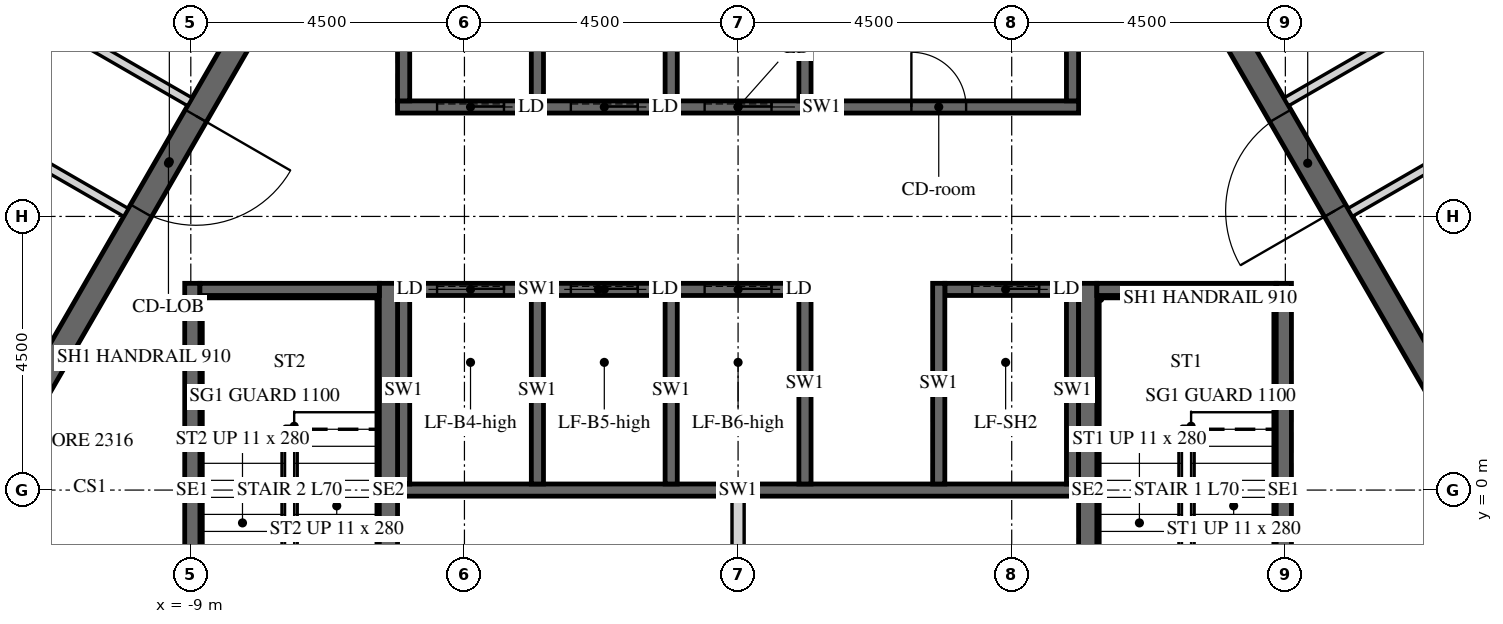
"""IFC4 building model, lengths in metres.
Left out: names, types, materials, properties, quantities, classifications, styles, units other than length and angle.
Written with IfcOpenShell. Run it as: python <this file> out.ifc"""

import sys

from ifc_helpers import new_model, si_unit, direction, frame, frame_2d, origin, place, context, subcontext, project, spatial, polyline, rectangle, outline, extrude, element, fill, save


model = new_model("IFC4")
c1 = context("Model", 3, precision=1e-05, world=origin(), true_north=direction((0.0, 1.0)))
c2 = subcontext(c1, "Body", "Model", "MODEL_VIEW")
j1 = project(units=[si_unit("LENGTHUNIT", "METRE"), si_unit("PLANEANGLEUNIT", "RADIAN")], contexts=[c1])
p1 = place(None, origin())
s1 = spatial("IfcSite", under=j1, at=p1, CompositionType="ELEMENT")
p2 = place(p1, origin())
s2 = spatial("IfcBuilding", under=s1, at=p2, CompositionType="ELEMENT")
p3 = place(p2, frame((0.0, 0.0, 291.3)))
s3 = spatial("IfcBuildingStorey", under=s2, at=p3, CompositionType="ELEMENT", Elevation=291.3)
p4 = place(p3, frame((-6.235, 10.8, -0.15), z_axis=(0.0, 0.0, 1.0), x_axis=(-0.499996419489, -0.866027470984, 0.0)))
e1 = element("IfcWall", 1, at=p4, inside=s3, PredefinedType="SHEAR", context=c2, shape_type="SweptSolid", body=[
    extrude(outline(polyline([(-0.115, -0.2), (12.586, -0.2), (12.355, 0.2), (0.115, 0.2), (-0.115, -0.2)])), origin(), (0.0, 0.0, 1.0), 3.9),
])
p5 = place(p4, frame((5.364, 0.0, 0.15)))
e2 = element("IfcOpeningElement", 2, at=p5, cuts=e1, PredefinedType="OPENING", context=c2, shape_type="SweptSolid", body=[
    extrude(rectangle(XDim=1.8, YDim=2.4, at=frame_2d((0.9, 1.2))), frame((0.0, 0.21, 0.0), z_axis=(0.0, -1.0, 0.0), x_axis=(1.0, 0.0, 0.0)), (0.0, 0.0, 1.0), 0.42),
])
p6 = place(p3, frame((-12.471, 0.0, -0.15), z_axis=(0.0, 0.0, 1.0), x_axis=(0.499996419489, -0.866027470984, 0.0)))
e3 = element("IfcWall", 3, at=p6, inside=s3, PredefinedType="SHEAR", context=c2, shape_type="SweptSolid", body=[
    extrude(outline(polyline([(-0.115, -0.2), (12.586, -0.2), (12.355, 0.2), (0.115, 0.2), (-0.115, -0.2)])), origin(), (0.0, 0.0, 1.0), 3.9),
])
p7 = place(p6, frame((5.306, 0.0, 0.15)))
e4 = element("IfcOpeningElement", 4, at=p7, cuts=e3, PredefinedType="OPENING", context=c2, shape_type="SweptSolid", body=[
    extrude(rectangle(XDim=1.8, YDim=2.4, at=frame_2d((0.9, 1.2))), frame((0.0, 0.21, 0.0), z_axis=(0.0, -1.0, 0.0), x_axis=(1.0, 0.0, 0.0)), (0.0, 0.0, 1.0), 0.42),
])
p8 = place(p3, frame((6.235, -10.8, -0.15), z_axis=(0.0, 0.0, 1.0), x_axis=(0.499996419489, 0.866027470984, 0.0)))
e5 = element("IfcWall", 5, at=p8, inside=s3, PredefinedType="SHEAR", context=c2, shape_type="SweptSolid", body=[
    extrude(outline(polyline([(-0.115, -0.2), (12.586, -0.2), (12.355, 0.2), (0.115, 0.2), (-0.115, -0.2)])), origin(), (0.0, 0.0, 1.0), 3.9),
])
p9 = place(p8, frame((5.364, 0.0, 0.15)))
e6 = element("IfcOpeningElement", 6, at=p9, cuts=e5, PredefinedType="OPENING", context=c2, shape_type="SweptSolid", body=[
    extrude(rectangle(XDim=1.8, YDim=2.4, at=frame_2d((0.9, 1.2))), frame((0.0, 0.21, 0.0), z_axis=(0.0, -1.0, 0.0), x_axis=(1.0, 0.0, 0.0)), (0.0, 0.0, 1.0), 0.42),
])
p10 = place(p3, frame((12.471, 0.0, -0.15), z_axis=(0.0, 0.0, 1.0), x_axis=(-0.499996419489, 0.866027470984, 0.0)))
e7 = element("IfcWall", 7, at=p10, inside=s3, PredefinedType="SHEAR", context=c2, shape_type="SweptSolid", body=[
    extrude(outline(polyline([(-0.115, -0.2), (12.586, -0.2), (12.355, 0.2), (0.115, 0.2), (-0.115, -0.2)])), origin(), (0.0, 0.0, 1.0), 3.9),
])
p11 = place(p10, frame((5.306, 0.0, 0.15)))
e8 = element("IfcOpeningElement", 8, at=p11, cuts=e7, PredefinedType="OPENING", context=c2, shape_type="SweptSolid", body=[
    extrude(rectangle(XDim=1.8, YDim=2.4, at=frame_2d((0.9, 1.2))), frame((0.0, 0.21, 0.0), z_axis=(0.0, -1.0, 0.0), x_axis=(1.0, 0.0, 0.0)), (0.0, 0.0, 1.0), 0.42),
])
p12 = place(p3, frame((-5.6, 6.3, -0.25), z_axis=(0.0, 0.0, 1.0), x_axis=(1.0, 0.0, 0.0)))
e9 = element("IfcWall", 9, at=p12, inside=s3, PredefinedType="SHEAR", context=c2, shape_type="SweptSolid", body=[
    extrude(rectangle(XDim=11.2, YDim=0.2, at=frame_2d((5.6, 0.0))), origin(), (0.0, 0.0, 1.0), 3.9),
])
p13 = place(p12, frame((8.45, 0.0, 0.25)))
e10 = element("IfcOpeningElement", 10, at=p13, cuts=e9, PredefinedType="OPENING", context=c2, shape_type="SweptSolid", body=[
    extrude(rectangle(XDim=0.9, YDim=2.1, at=frame_2d((0.45, 1.05))), frame((0.0, 0.11, 0.0), z_axis=(0.0, -1.0, 0.0), x_axis=(1.0, 0.0, 0.0)), (0.0, 0.0, 1.0), 0.22),
])
p14 = place(p12, frame((0.65, 0.0, 0.25)))
e11 = element("IfcOpeningElement", 11, at=p14, cuts=e9, PredefinedType="OPENING", context=c2, shape_type="SweptSolid", body=[
    extrude(rectangle(XDim=1.1, YDim=2.1, at=frame_2d((0.55, 1.05))), frame((0.0, 0.11, 0.0), z_axis=(0.0, -1.0, 0.0), x_axis=(1.0, 0.0, 0.0)), (0.0, 0.0, 1.0), 0.22),
])
p15 = place(p12, frame((2.85, 0.0, 0.25)))
e12 = element("IfcOpeningElement", 12, at=p15, cuts=e9, PredefinedType="OPENING", context=c2, shape_type="SweptSolid", body=[
    extrude(rectangle(XDim=1.1, YDim=2.1, at=frame_2d((0.55, 1.05))), frame((0.0, 0.11, 0.0), z_axis=(0.0, -1.0, 0.0), x_axis=(1.0, 0.0, 0.0)), (0.0, 0.0, 1.0), 0.22),
])
p16 = place(p12, frame((5.05, 0.0, 0.25)))
e13 = element("IfcOpeningElement", 13, at=p16, cuts=e9, PredefinedType="OPENING", context=c2, shape_type="SweptSolid", body=[
    extrude(rectangle(XDim=1.1, YDim=2.1, at=frame_2d((0.55, 1.05))), frame((0.0, 0.11, 0.0), z_axis=(0.0, -1.0, 0.0), x_axis=(1.0, 0.0, 0.0)), (0.0, 0.0, 1.0), 0.22),
])
for number, where, z_axis, x_axis in (
    (14, (-5.5, 6.4, -0.25), (0.0, 0.0, 1.0), (0.0, 1.0, 0.0)),
    (15, (-3.3, 6.4, -0.25), (0.0, 0.0, 1.0), (0.0, 1.0, 0.0)),
    (16, (-1.1, 6.4, -0.25), (0.0, 0.0, 1.0), (0.0, 1.0, 0.0)),
    (17, (1.1, 6.4, -0.25), (0.0, 0.0, 1.0), (0.0, 1.0, 0.0)),
    (18, (5.5, 6.4, -0.25), (0.0, 0.0, 1.0), (0.0, 1.0, 0.0)),
):
    element("IfcWall", number, at=place(p3, frame(where, z_axis=z_axis, x_axis=x_axis)), inside=s3, PredefinedType="SHEAR", context=c2, shape_type="SweptSolid", body=[
        extrude(rectangle(XDim=2.9, YDim=0.2, at=frame_2d((1.45, 0.0))), origin(), (0.0, 0.0, 1.0), 3.9),
    ])
p17 = place(p3, frame((-5.6, 3.3, -0.25), z_axis=(0.0, 0.0, 1.0), x_axis=(1.0, 0.0, 0.0)))
e19 = element("IfcWall", 19, at=p17, inside=s3, PredefinedType="SHEAR", context=c2, shape_type="SweptSolid", body=[
    extrude(rectangle(XDim=6.6, YDim=0.2, at=frame_2d((3.3, 0.0))), origin(), (0.0, 0.0, 1.0), 3.9),
])
p18 = place(p17, frame((0.65, 0.0, 0.25)))
e20 = element("IfcOpeningElement", 20, at=p18, cuts=e19, PredefinedType="OPENING", context=c2, shape_type="SweptSolid", body=[
    extrude(rectangle(XDim=1.1, YDim=2.1, at=frame_2d((0.55, 1.05))), frame((0.0, 0.11, 0.0), z_axis=(0.0, -1.0, 0.0), x_axis=(1.0, 0.0, 0.0)), (0.0, 0.0, 1.0), 0.22),
])
p19 = place(p17, frame((2.85, 0.0, 0.25)))
e21 = element("IfcOpeningElement", 21, at=p19, cuts=e19, PredefinedType="OPENING", context=c2, shape_type="SweptSolid", body=[
    extrude(rectangle(XDim=1.1, YDim=2.1, at=frame_2d((0.55, 1.05))), frame((0.0, 0.11, 0.0), z_axis=(0.0, -1.0, 0.0), x_axis=(1.0, 0.0, 0.0)), (0.0, 0.0, 1.0), 0.22),
])
p20 = place(p17, frame((5.05, 0.0, 0.25)))
e22 = element("IfcOpeningElement", 22, at=p20, cuts=e19, PredefinedType="OPENING", context=c2, shape_type="SweptSolid", body=[
    extrude(rectangle(XDim=1.1, YDim=2.1, at=frame_2d((0.55, 1.05))), frame((0.0, 0.11, 0.0), z_axis=(0.0, -1.0, 0.0), x_axis=(1.0, 0.0, 0.0)), (0.0, 0.0, 1.0), 0.22),
])
p21 = place(p3, frame((3.4, 3.3, -0.25), z_axis=(0.0, 0.0, 1.0), x_axis=(1.0, 0.0, 0.0)))
e23 = element("IfcWall", 23, at=p21, inside=s3, PredefinedType="SHEAR", context=c2, shape_type="SweptSolid", body=[
    extrude(rectangle(XDim=2.2, YDim=0.2, at=frame_2d((1.1, 0.0))), origin(), (0.0, 0.0, 1.0), 3.9),
])
p22 = place(p21, frame((0.45, 0.0, 0.25)))
e24 = element("IfcOpeningElement", 24, at=p22, cuts=e23, PredefinedType="OPENING", context=c2, shape_type="SweptSolid", body=[
    extrude(rectangle(XDim=1.1, YDim=2.1, at=frame_2d((0.55, 1.05))), frame((0.0, 0.11, 0.0), z_axis=(0.0, -1.0, 0.0), x_axis=(1.0, 0.0, 0.0)), (0.0, 0.0, 1.0), 0.22),
])
p23 = place(p3, frame((-5.6, 0.0, -0.25), z_axis=(0.0, 0.0, 1.0), x_axis=(1.0, 0.0, 0.0)))
e25 = element("IfcWall", 25, at=p23, inside=s3, PredefinedType="SHEAR", context=c2, shape_type="SweptSolid", body=[
    extrude(rectangle(XDim=11.2, YDim=0.2, at=frame_2d((5.6, 0.0))), origin(), (0.0, 0.0, 1.0), 3.9),
])
for number, where, z_axis, x_axis in (
    (26, (-5.5, 0.1, -0.25), (0.0, 0.0, 1.0), (0.0, 1.0, 0.0)),
    (27, (-3.3, 0.1, -0.25), (0.0, 0.0, 1.0), (0.0, 1.0, 0.0)),
    (28, (-1.1, 0.1, -0.25), (0.0, 0.0, 1.0), (0.0, 1.0, 0.0)),
):
    element("IfcWall", number, at=place(p3, frame(where, z_axis=z_axis, x_axis=x_axis)), inside=s3, PredefinedType="SHEAR", context=c2, shape_type="SweptSolid", body=[
        extrude(rectangle(XDim=3.1, YDim=0.2, at=frame_2d((1.55, 0.0))), origin(), (0.0, 0.0, 1.0), 3.9),
    ])
for number, where, z_axis, x_axis in (
    (29, (1.1, 0.1, -0.25), (0.0, 0.0, 1.0), (0.0, 1.0, 0.0)),
    (30, (3.3, 0.1, -0.25), (0.0, 0.0, 1.0), (0.0, 1.0, 0.0)),
):
    element("IfcWall", number, at=place(p3, frame(where, z_axis=z_axis, x_axis=x_axis)), inside=s3, PredefinedType="SHEAR", context=c2, shape_type="SweptSolid", body=[
        extrude(rectangle(XDim=3.3, YDim=0.2, at=frame_2d((1.65, 0.0))), origin(), (0.0, 0.0, 1.0), 3.9),
    ])
p24 = place(p3, frame((5.5, 0.1, -0.25), z_axis=(0.0, 0.0, 1.0), x_axis=(0.0, 1.0, 0.0)))
e31 = element("IfcWall", 31, at=p24, inside=s3, PredefinedType="SHEAR", context=c2, shape_type="SweptSolid", body=[
    extrude(rectangle(XDim=3.1, YDim=0.2, at=frame_2d((1.55, 0.0))), origin(), (0.0, 0.0, 1.0), 3.9),
])
p25 = place(p3, frame((0.0, -6.2, 0.0), z_axis=(0.0, 0.0, 1.0), x_axis=(0.0, 1.0, 0.0)))
e32 = element("IfcWall", 32, at=p25, inside=s3, PredefinedType="PARTITIONING", context=c2, shape_type="SweptSolid", body=[
    extrude(rectangle(XDim=6.1, YDim=0.2, at=frame_2d((3.05, 0.0))), origin(), (0.0, 0.0, 1.0), 3.65),
])
p26 = place(p3, frame((5.75, -3.4, -0.25), z_axis=(0.0, 0.0, 1.0), x_axis=(0.0, 1.0, 0.0)))
e33 = element("IfcWall", 33, at=p26, inside=s3, PredefinedType="SHEAR", context=c2, shape_type="SweptSolid", body=[
    extrude(rectangle(XDim=6.8, YDim=0.3, at=frame_2d((3.4, 0.0))), origin(), (0.0, 0.0, 1.0), 3.9),
])
p27 = place(p3, frame((8.975, -3.4, -0.25), z_axis=(0.0, 0.0, 1.0), x_axis=(0.0, 1.0, 0.0)))
e34 = element("IfcWall", 34, at=p27, inside=s3, PredefinedType="SHEAR", context=c2, shape_type="SweptSolid", body=[
    extrude(rectangle(XDim=6.8, YDim=0.25, at=frame_2d((3.4, 0.0))), origin(), (0.0, 0.0, 1.0), 3.9),
])
p28 = place(p3, frame((5.9, 3.3, -0.25), z_axis=(0.0, 0.0, 1.0), x_axis=(1.0, 0.0, 0.0)))
e35 = element("IfcWall", 35, at=p28, inside=s3, PredefinedType="SHEAR", context=c2, shape_type="SweptSolid", body=[
    extrude(rectangle(XDim=2.95, YDim=0.2, at=frame_2d((1.475, 0.0))), origin(), (0.0, 0.0, 1.0), 3.9),
])
p29 = place(p3, frame((-5.75, -3.4, -0.25), z_axis=(0.0, 0.0, 1.0), x_axis=(0.0, 1.0, 0.0)))
e36 = element("IfcWall", 36, at=p29, inside=s3, PredefinedType="SHEAR", context=c2, shape_type="SweptSolid", body=[
    extrude(rectangle(XDim=6.8, YDim=0.3, at=frame_2d((3.4, 0.0))), origin(), (0.0, 0.0, 1.0), 3.9),
])
p30 = place(p3, frame((-8.975, -3.4, -0.25), z_axis=(0.0, 0.0, 1.0), x_axis=(0.0, 1.0, 0.0)))
e37 = element("IfcWall", 37, at=p30, inside=s3, PredefinedType="SHEAR", context=c2, shape_type="SweptSolid", body=[
    extrude(rectangle(XDim=6.8, YDim=0.25, at=frame_2d((3.4, 0.0))), origin(), (0.0, 0.0, 1.0), 3.9),
])
p31 = place(p3, frame((-8.85, 3.3, -0.25), z_axis=(0.0, 0.0, 1.0), x_axis=(1.0, 0.0, 0.0)))
e38 = element("IfcWall", 38, at=p31, inside=s3, PredefinedType="SHEAR", context=c2, shape_type="SweptSolid", body=[
    extrude(rectangle(XDim=2.95, YDim=0.2, at=frame_2d((1.475, 0.0))), origin(), (0.0, 0.0, 1.0), 3.9),
])
p32 = place(p3, frame((-8.434, 16.925, 0.0), z_axis=(0.0, 0.0, 1.0), x_axis=(-0.438371383278, -0.898793930956, 0.0)))
e39 = element("IfcWall", 39, at=p32, inside=s3, PredefinedType="PARTITIONING", context=c2, shape_type="SweptSolid", body=[
    extrude(rectangle(XDim=16.939, YDim=0.15, at=frame_2d((8.47, 0.0))), origin(), (0.0, 0.0, 1.0), 2.988),
])
p33 = place(p32, frame((3.142, 0.0, 0.0)))
e40 = element("IfcOpeningElement", 40, at=p33, cuts=e39, PredefinedType="OPENING", context=c2, shape_type="SweptSolid", body=[
    extrude(rectangle(XDim=1.0, YDim=2.1, at=frame_2d((0.5, 1.05))), frame((0.0, 0.085, 0.0), z_axis=(0.0, -1.0, 0.0), x_axis=(1.0, 0.0, 0.0)), (0.0, 0.0, 1.0), 0.17),
])
p34 = place(p32, frame((15.39, 0.0, 0.0)))
e41 = element("IfcOpeningElement", 41, at=p34, cuts=e39, PredefinedType="OPENING", context=c2, shape_type="SweptSolid", body=[
    extrude(rectangle(XDim=1.0, YDim=2.1, at=frame_2d((0.5, 1.05))), frame((0.0, 0.085, 0.0), z_axis=(0.0, -1.0, 0.0), x_axis=(1.0, 0.0, 0.0)), (0.0, 0.0, 1.0), 0.17),
])
p35 = place(p3, frame((-9.016, 6.384, 0.0), z_axis=(0.0, 0.0, 1.0), x_axis=(-0.866031051173, 0.499990218309, 0.0)))
e42 = element("IfcWall", 42, at=p35, inside=s3, PredefinedType="PARTITIONING", context=c2, shape_type="SweptSolid", body=[
    extrude(rectangle(XDim=2.604, YDim=0.15, at=frame_2d((1.302, 0.0))), origin(), (0.0, 0.0, 1.0), 2.988),
])
p36 = place(p3, frame((-12.129, 5.757, 0.0), z_axis=(0.0, 0.0, 1.0), x_axis=(0.866033707122, -0.499985617921, 0.0)))
e43 = element("IfcWall", 43, at=p36, inside=s3, PredefinedType="PARTITIONING", context=c2, shape_type="SweptSolid", body=[
    extrude(rectangle(XDim=2.382, YDim=0.15, at=frame_2d((1.191, 0.0))), origin(), (0.0, 0.0, 1.0), 2.988),
])
p37 = place(p3, frame((18.875, -1.158, 0.0), z_axis=(0.0, 0.0, 1.0), x_axis=(-0.55919880344, 0.829033592945, 0.0)))
e44 = element("IfcWall", 44, at=p37, inside=s3, PredefinedType="PARTITIONING", context=c2, shape_type="SweptSolid", body=[
    extrude(rectangle(XDim=16.939, YDim=0.15, at=frame_2d((8.47, 0.0))), origin(), (0.0, 0.0, 1.0), 2.988),
])
p38 = place(p37, frame((6.09, 0.0, 0.0)))
e45 = element("IfcOpeningElement", 45, at=p38, cuts=e44, PredefinedType="OPENING", context=c2, shape_type="SweptSolid", body=[
    extrude(rectangle(XDim=1.0, YDim=2.1, at=frame_2d((0.5, 1.05))), frame((0.0, 0.085, 0.0), z_axis=(0.0, -1.0, 0.0), x_axis=(1.0, 0.0, 0.0)), (0.0, 0.0, 1.0), 0.17),
])
p39 = place(p3, frame((10.066, 4.566, 0.0), z_axis=(0.0, 0.0, 1.0), x_axis=(0.866034402474, 0.499984413489, 0.0)))
e46 = element("IfcWall", 46, at=p39, inside=s3, PredefinedType="PARTITIONING", context=c2, shape_type="SweptSolid", body=[
    extrude(rectangle(XDim=2.608, YDim=0.15, at=frame_2d((1.304, 0.0))), origin(), (0.0, 0.0, 1.0), 2.988),
])
p40 = place(p3, frame((11.082, 7.578, 0.0), z_axis=(0.0, 0.0, 1.0), x_axis=(-0.865993065409, -0.500056007527, 0.0)))
e47 = element("IfcWall", 47, at=p40, inside=s3, PredefinedType="PARTITIONING", context=c2, shape_type="SweptSolid", body=[
    extrude(rectangle(XDim=2.386, YDim=0.15, at=frame_2d((1.193, 0.0))), origin(), (0.0, 0.0, 1.0), 2.988),
])
p41 = place(p5, origin())
e48 = element("IfcDoor", 48, at=p41, inside=s3, OperationType="DOUBLE_DOOR_SINGLE_SWING", PredefinedType="DOOR", context=c2, shape_type="SweptSolid", body=[
    extrude(rectangle(XDim=1.8, YDim=2.4, at=frame_2d((0.9, 1.2))), frame((0.0, 0.025, 0.0), z_axis=(0.0, -1.0, 0.0), x_axis=(1.0, 0.0, 0.0)), (0.0, 0.0, 1.0), 0.05),
])
fill(e2, e48)
p42 = place(p11, origin())
e49 = element("IfcDoor", 49, at=p42, inside=s3, OperationType="DOUBLE_DOOR_SINGLE_SWING", PredefinedType="DOOR", context=c2, shape_type="SweptSolid", body=[
    extrude(rectangle(XDim=1.8, YDim=2.4, at=frame_2d((0.9, 1.2))), frame((0.0, 0.025, 0.0), z_axis=(0.0, -1.0, 0.0), x_axis=(1.0, 0.0, 0.0)), (0.0, 0.0, 1.0), 0.05),
])
fill(e8, e49)
p43 = place(p13, origin())
e50 = element("IfcDoor", 50, at=p43, inside=s3, OperationType="SINGLE_SWING_LEFT", PredefinedType="DOOR", context=c2, shape_type="SweptSolid", body=[
    extrude(rectangle(XDim=0.9, YDim=2.1, at=frame_2d((0.45, 1.05))), frame((0.0, 0.025, 0.0), z_axis=(0.0, -1.0, 0.0), x_axis=(1.0, 0.0, 0.0)), (0.0, 0.0, 1.0), 0.05),
])
fill(e10, e50)
p44 = place(p14, origin())
e51 = element("IfcDoor", 51, at=p44, inside=s3, OperationType="SLIDING_TO_LEFT", PredefinedType="DOOR", context=c2, shape_type="SweptSolid", body=[
    extrude(rectangle(XDim=1.1, YDim=2.1, at=frame_2d((0.55, 1.05))), frame((0.0, 0.025, 0.0), z_axis=(0.0, -1.0, 0.0), x_axis=(1.0, 0.0, 0.0)), (0.0, 0.0, 1.0), 0.05),
])
fill(e11, e51)
p45 = place(p15, origin())
e52 = element("IfcDoor", 52, at=p45, inside=s3, OperationType="SLIDING_TO_LEFT", PredefinedType="DOOR", context=c2, shape_type="SweptSolid", body=[
    extrude(rectangle(XDim=1.1, YDim=2.1, at=frame_2d((0.55, 1.05))), frame((0.0, 0.025, 0.0), z_axis=(0.0, -1.0, 0.0), x_axis=(1.0, 0.0, 0.0)), (0.0, 0.0, 1.0), 0.05),
])
fill(e12, e52)
p46 = place(p16, origin())
e53 = element("IfcDoor", 53, at=p46, inside=s3, OperationType="SLIDING_TO_LEFT", PredefinedType="DOOR", context=c2, shape_type="SweptSolid", body=[
    extrude(rectangle(XDim=1.1, YDim=2.1, at=frame_2d((0.55, 1.05))), frame((0.0, 0.025, 0.0), z_axis=(0.0, -1.0, 0.0), x_axis=(1.0, 0.0, 0.0)), (0.0, 0.0, 1.0), 0.05),
])
fill(e13, e53)
p47 = place(p18, origin())
e54 = element("IfcDoor", 54, at=p47, inside=s3, OperationType="SLIDING_TO_LEFT", PredefinedType="DOOR", context=c2, shape_type="SweptSolid", body=[
    extrude(rectangle(XDim=1.1, YDim=2.1, at=frame_2d((0.55, 1.05))), frame((0.0, 0.025, 0.0), z_axis=(0.0, -1.0, 0.0), x_axis=(1.0, 0.0, 0.0)), (0.0, 0.0, 1.0), 0.05),
])
fill(e20, e54)
p48 = place(p19, origin())
e55 = element("IfcDoor", 55, at=p48, inside=s3, OperationType="SLIDING_TO_LEFT", PredefinedType="DOOR", context=c2, shape_type="SweptSolid", body=[
    extrude(rectangle(XDim=1.1, YDim=2.1, at=frame_2d((0.55, 1.05))), frame((0.0, 0.025, 0.0), z_axis=(0.0, -1.0, 0.0), x_axis=(1.0, 0.0, 0.0)), (0.0, 0.0, 1.0), 0.05),
])
fill(e21, e55)
p49 = place(p20, origin())
e56 = element("IfcDoor", 56, at=p49, inside=s3, OperationType="SLIDING_TO_LEFT", PredefinedType="DOOR", context=c2, shape_type="SweptSolid", body=[
    extrude(rectangle(XDim=1.1, YDim=2.1, at=frame_2d((0.55, 1.05))), frame((0.0, 0.025, 0.0), z_axis=(0.0, -1.0, 0.0), x_axis=(1.0, 0.0, 0.0)), (0.0, 0.0, 1.0), 0.05),
])
fill(e22, e56)
p50 = place(p22, origin())
e57 = element("IfcDoor", 57, at=p50, inside=s3, OperationType="SLIDING_TO_LEFT", PredefinedType="DOOR", context=c2, shape_type="SweptSolid", body=[
    extrude(rectangle(XDim=1.1, YDim=2.1, at=frame_2d((0.55, 1.05))), frame((0.0, 0.025, 0.0), z_axis=(0.0, -1.0, 0.0), x_axis=(1.0, 0.0, 0.0)), (0.0, 0.0, 1.0), 0.05),
])
fill(e24, e57)
save(model, sys.argv[1])
